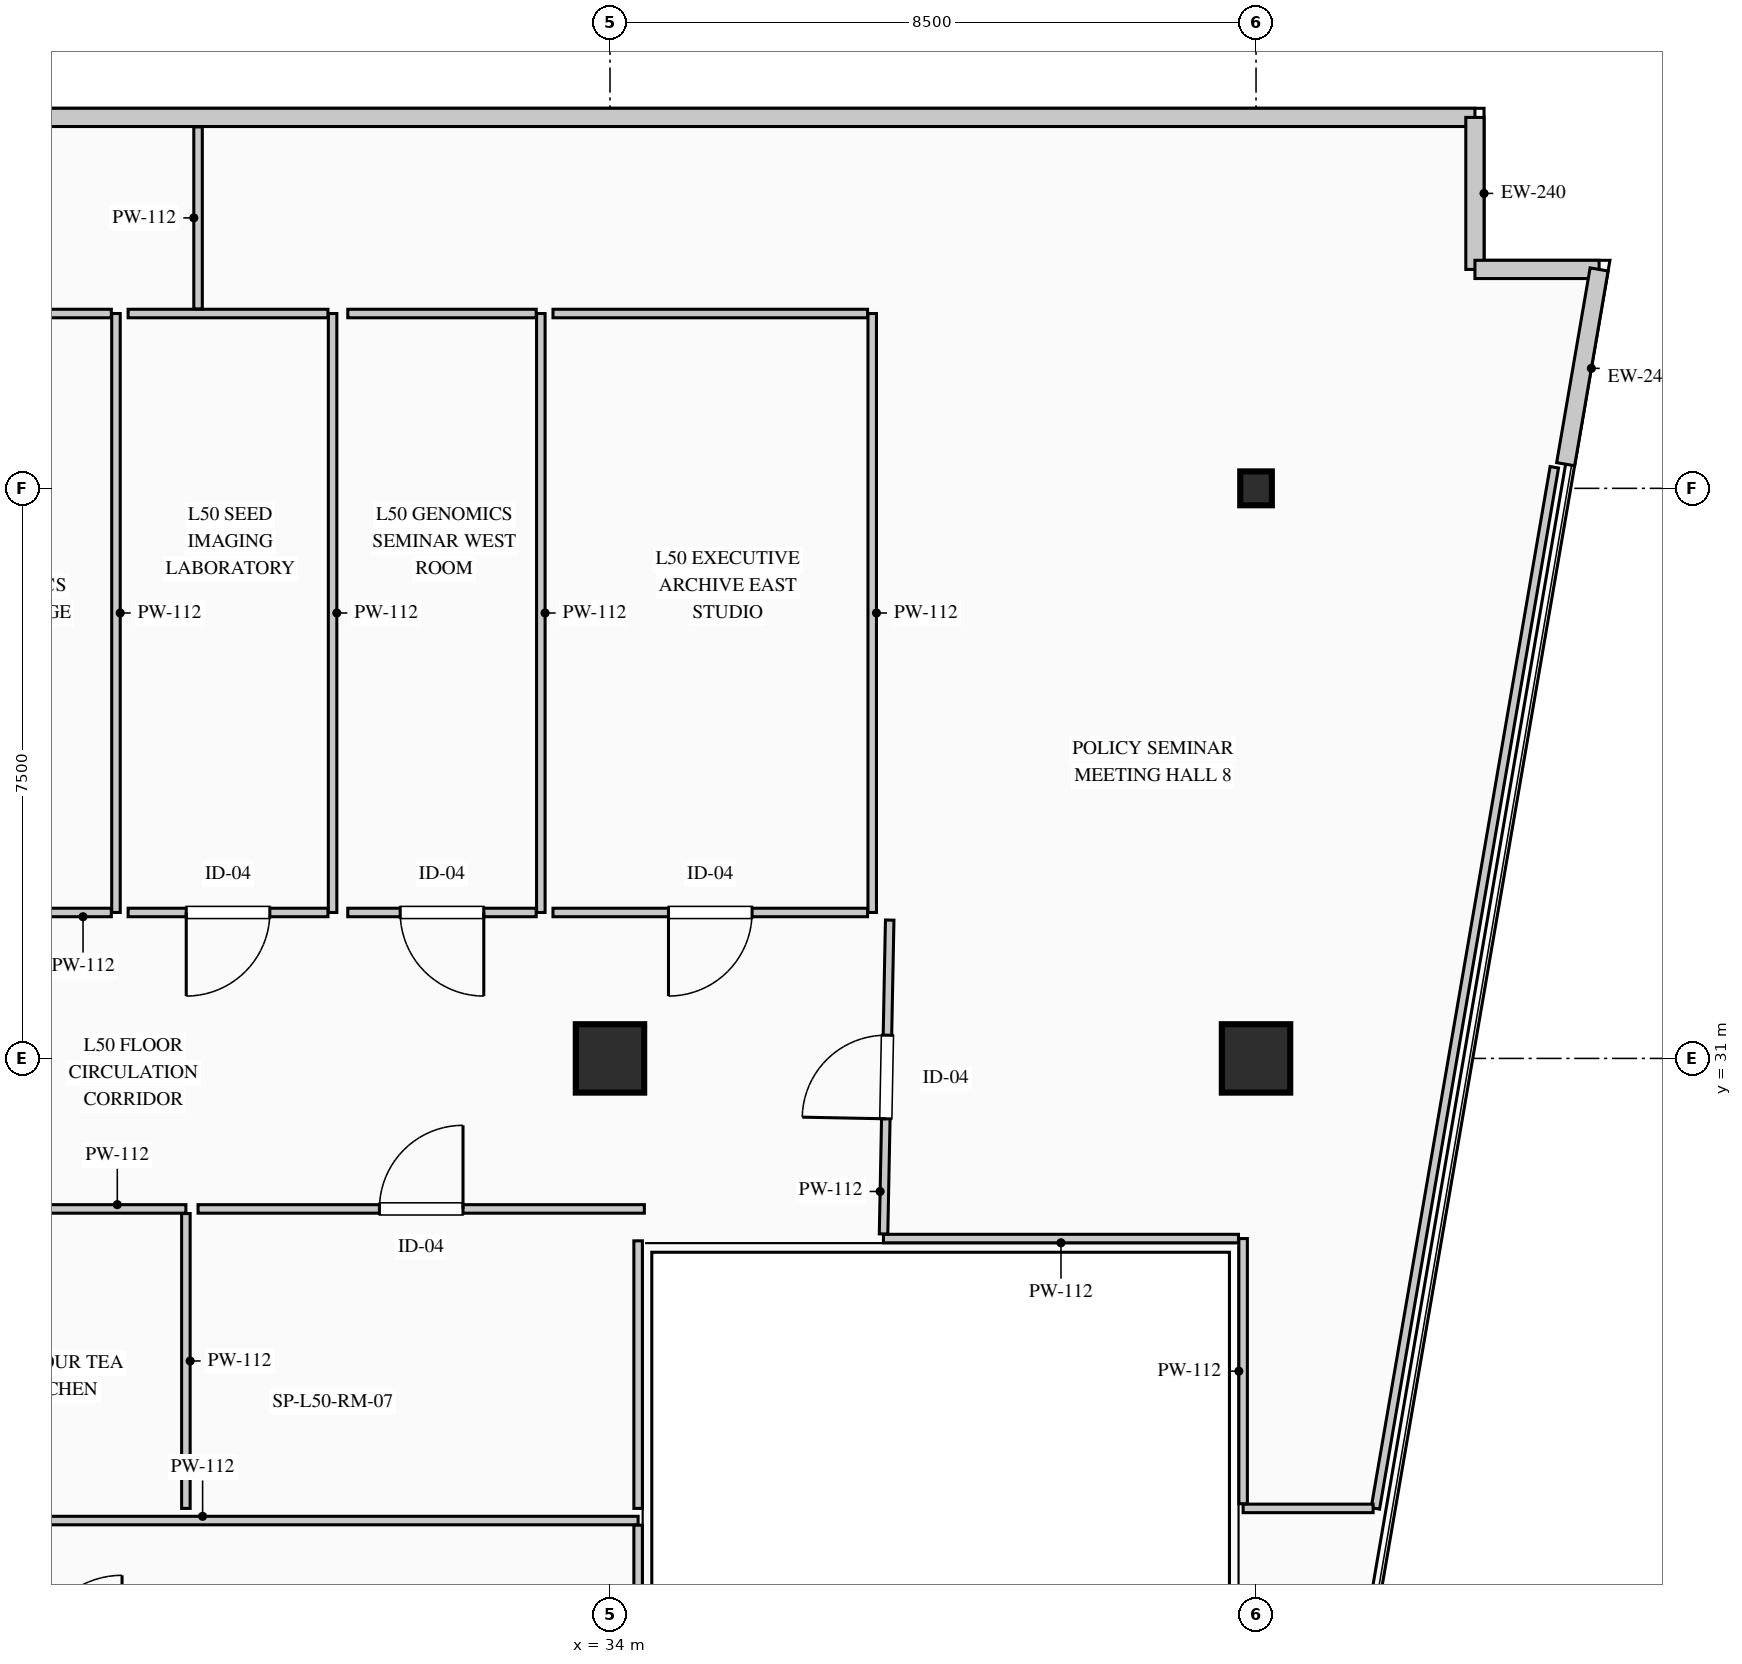
"""IFC4 building model, lengths in metres.
Left out: names, types, materials, properties, quantities, classifications, styles, units other than length and angle.
Written with IfcOpenShell. Run it as: python <this file> out.ifc"""

import sys

from ifc_helpers import new_model, si_unit, direction, frame, frame_2d, origin, origin_2d, place, context, subcontext, project, spatial, rectangle, i_section, extrude, element, fill, save


model = new_model("IFC4")
c1 = context("Model", 3, precision=1e-05, world=origin(), true_north=direction((0.0, 1.0)))
c2 = subcontext(c1, "Body", "Model", "MODEL_VIEW")
j1 = project(units=[si_unit("LENGTHUNIT", "METRE"), si_unit("PLANEANGLEUNIT", "RADIAN")], contexts=[c1])
p1 = place(None, origin())
s1 = spatial("IfcSite", under=j1, at=p1, CompositionType="ELEMENT")
p2 = place(p1, origin())
s2 = spatial("IfcBuilding", under=s1, at=p2, CompositionType="ELEMENT")
p3 = place(p2, frame((0.0, 0.0, 211.4)))
s3 = spatial("IfcBuildingStorey", under=s2, at=p3, CompositionType="ELEMENT", Elevation=211.4)
for number, where, z_axis, x_axis in (
    (1, (34.0, 31.0, 0.0), (0.0, 0.0, 1.0), (1.0, 0.0, 0.0)),
    (2, (42.5, 31.0, 0.0), (0.0, 0.0, 1.0), (1.0, 0.0, 0.0)),
):
    element("IfcColumn", number, at=place(p3, frame(where, z_axis=z_axis, x_axis=x_axis)), inside=s3, PredefinedType="COLUMN", context=c2, shape_type="SweptSolid", body=[
        extrude(rectangle(XDim=0.9, YDim=0.9, at=origin_2d()), origin(), (0.0, 0.0, 1.0), 3.95),
    ])
p4 = place(p3, frame((42.5, 38.5, 0.0), z_axis=(0.0, 0.0, 1.0), x_axis=(1.0, 0.0, 0.0)))
e3 = element("IfcColumn", 3, at=p4, inside=s3, PredefinedType="COLUMN", context=c2, shape_type="SweptSolid", body=[
    extrude(i_section(OverallWidth=0.416, OverallDepth=0.446, WebThickness=0.039, FlangeThickness=0.063, FilletRadius=0.015, at=origin_2d()), origin(), (0.0, 0.0, 1.0), 3.95),
])
p5 = place(p3, frame((4.62, 43.38, 0.0), z_axis=(0.0, 0.0, 1.0), x_axis=(1.0, 0.0, 0.0)))
e4 = element("IfcWall", 4, at=p5, inside=s3, PredefinedType="STANDARD", context=c2, shape_type="SweptSolid", body=[
    extrude(rectangle(XDim=40.76, YDim=0.24, at=frame_2d((20.38, 0.0))), origin(), (0.0, 0.0, 1.0), 3.7),
])
p6 = place(p5, frame((13.324, 0.0, 0.9)))
e5 = element("IfcOpeningElement", 5, at=p6, cuts=e4, PredefinedType="OPENING", context=c2, shape_type="SweptSolid", body=[
    extrude(rectangle(XDim=2.7, YDim=2.1, at=frame_2d((1.35, 1.05))), frame((0.0, 0.13, 0.0), z_axis=(0.0, -1.0, 0.0), x_axis=(1.0, 0.0, 0.0)), (0.0, 0.0, 1.0), 0.26),
])
p7 = place(p3, frame((45.38, 43.38, 0.0), z_axis=(0.0, 0.0, 1.0), x_axis=(0.0, -1.0, 0.0)))
e6 = element("IfcWall", 6, at=p7, inside=s3, PredefinedType="STANDARD", context=c2, shape_type="SweptSolid", body=[
    extrude(rectangle(XDim=2.0, YDim=0.24, at=frame_2d((1.0, 0.0))), origin(), (0.0, 0.0, 1.0), 3.7),
])
p8 = place(p3, frame((45.38, 41.38, 0.0), z_axis=(0.0, 0.0, 1.0), x_axis=(1.0, 0.0, 0.0)))
e7 = element("IfcWall", 7, at=p8, inside=s3, PredefinedType="STANDARD", context=c2, shape_type="SweptSolid", body=[
    extrude(rectangle(XDim=1.634, YDim=0.24, at=frame_2d((0.817, 0.0))), origin(), (0.0, 0.0, 1.0), 3.7),
])
p9 = place(p3, frame((47.014, 41.38, 0.0), z_axis=(0.0, 0.0, 1.0), x_axis=(-0.169406892601, -0.985546196147, 0.0)))
e8 = element("IfcWall", 8, at=p9, inside=s3, PredefinedType="STANDARD", context=c2, shape_type="SweptSolid", body=[
    extrude(rectangle(XDim=2.6, YDim=0.24, at=frame_2d((1.3, 0.0))), origin(), (0.0, 0.0, 1.0), 3.7),
])
p10 = place(p3, frame((27.5, 40.8, 0.0), z_axis=(0.0, 0.0, 1.0), x_axis=(0.0, -1.0, 0.0)))
e9 = element("IfcWall", 9, at=p10, inside=s3, PredefinedType="PARTITIONING", context=c2, shape_type="SweptSolid", body=[
    extrude(rectangle(XDim=7.88, YDim=0.112, at=frame_2d((3.94, 0.0))), origin(), (0.0, 0.0, 1.0), 3.7),
])
p11 = place(p3, frame((27.439, 32.92, 0.0), z_axis=(0.0, 0.0, 1.0), x_axis=(-1.0, 0.0, 0.0)))
e10 = element("IfcWall", 10, at=p11, inside=s3, PredefinedType="PARTITIONING", context=c2, shape_type="SweptSolid", body=[
    extrude(rectangle(XDim=3.389, YDim=0.112, at=frame_2d((1.694, 0.0))), origin(), (0.0, 0.0, 1.0), 3.7),
])
p12 = place(p11, frame((1.145, 0.0, 0.0)))
e11 = element("IfcOpeningElement", 11, at=p12, cuts=e10, PredefinedType="OPENING", context=c2, shape_type="SweptSolid", body=[
    extrude(rectangle(XDim=1.1, YDim=2.2, at=frame_2d((0.55, 1.1))), frame((0.0, 0.066, 0.0), z_axis=(0.0, -1.0, 0.0), x_axis=(1.0, 0.0, 0.0)), (0.0, 0.0, 1.0), 0.132),
])
p13 = place(p3, frame((24.111, 40.8, 0.0), z_axis=(0.0, 0.0, 1.0), x_axis=(1.0, 0.0, 0.0)))
e12 = element("IfcWall", 12, at=p13, inside=s3, PredefinedType="PARTITIONING", context=c2, shape_type="SweptSolid", body=[
    extrude(rectangle(XDim=3.328, YDim=0.112, at=frame_2d((1.664, 0.0))), origin(), (0.0, 0.0, 1.0), 3.7),
])
p14 = place(p3, frame((30.35, 40.8, 0.0), z_axis=(0.0, 0.0, 1.0), x_axis=(0.0, -1.0, 0.0)))
e13 = element("IfcWall", 13, at=p14, inside=s3, PredefinedType="PARTITIONING", context=c2, shape_type="SweptSolid", body=[
    extrude(rectangle(XDim=7.88, YDim=0.112, at=frame_2d((3.94, 0.0))), origin(), (0.0, 0.0, 1.0), 3.7),
])
p15 = place(p3, frame((30.289, 32.92, 0.0), z_axis=(0.0, 0.0, 1.0), x_axis=(-1.0, 0.0, 0.0)))
e14 = element("IfcWall", 14, at=p15, inside=s3, PredefinedType="PARTITIONING", context=c2, shape_type="SweptSolid", body=[
    extrude(rectangle(XDim=2.629, YDim=0.112, at=frame_2d((1.314, 0.0))), origin(), (0.0, 0.0, 1.0), 3.7),
])
p16 = place(p15, frame((0.764, 0.0, 0.0)))
e15 = element("IfcOpeningElement", 15, at=p16, cuts=e14, PredefinedType="OPENING", context=c2, shape_type="SweptSolid", body=[
    extrude(rectangle(XDim=1.1, YDim=2.2, at=frame_2d((0.55, 1.1))), frame((0.0, 0.066, 0.0), z_axis=(0.0, -1.0, 0.0), x_axis=(1.0, 0.0, 0.0)), (0.0, 0.0, 1.0), 0.132),
])
p17 = place(p3, frame((27.66, 40.8, 0.0), z_axis=(0.0, 0.0, 1.0), x_axis=(1.0, 0.0, 0.0)))
e16 = element("IfcWall", 16, at=p17, inside=s3, PredefinedType="PARTITIONING", context=c2, shape_type="SweptSolid", body=[
    extrude(rectangle(XDim=2.629, YDim=0.112, at=frame_2d((1.314, 0.0))), origin(), (0.0, 0.0, 1.0), 3.7),
])
p18 = place(p3, frame((33.09, 40.8, 0.0), z_axis=(0.0, 0.0, 1.0), x_axis=(0.0, -1.0, 0.0)))
e17 = element("IfcWall", 17, at=p18, inside=s3, PredefinedType="PARTITIONING", context=c2, shape_type="SweptSolid", body=[
    extrude(rectangle(XDim=7.88, YDim=0.112, at=frame_2d((3.94, 0.0))), origin(), (0.0, 0.0, 1.0), 3.7),
])
p19 = place(p3, frame((33.029, 32.92, 0.0), z_axis=(0.0, 0.0, 1.0), x_axis=(-1.0, 0.0, 0.0)))
e18 = element("IfcWall", 18, at=p19, inside=s3, PredefinedType="PARTITIONING", context=c2, shape_type="SweptSolid", body=[
    extrude(rectangle(XDim=2.479, YDim=0.112, at=frame_2d((1.24, 0.0))), origin(), (0.0, 0.0, 1.0), 3.7),
])
p20 = place(p19, frame((0.689, 0.0, 0.0)))
e19 = element("IfcOpeningElement", 19, at=p20, cuts=e18, PredefinedType="OPENING", context=c2, shape_type="SweptSolid", body=[
    extrude(rectangle(XDim=1.1, YDim=2.2, at=frame_2d((0.55, 1.1))), frame((0.0, 0.066, 0.0), z_axis=(0.0, -1.0, 0.0), x_axis=(1.0, 0.0, 0.0)), (0.0, 0.0, 1.0), 0.132),
])
p21 = place(p3, frame((30.55, 40.8, 0.0), z_axis=(0.0, 0.0, 1.0), x_axis=(1.0, 0.0, 0.0)))
e20 = element("IfcWall", 20, at=p21, inside=s3, PredefinedType="PARTITIONING", context=c2, shape_type="SweptSolid", body=[
    extrude(rectangle(XDim=2.479, YDim=0.112, at=frame_2d((1.24, 0.0))), origin(), (0.0, 0.0, 1.0), 3.7),
])
p22 = place(p3, frame((37.45, 40.8, 0.0), z_axis=(0.0, 0.0, 1.0), x_axis=(0.0, -1.0, 0.0)))
e21 = element("IfcWall", 21, at=p22, inside=s3, PredefinedType="PARTITIONING", context=c2, shape_type="SweptSolid", body=[
    extrude(rectangle(XDim=7.88, YDim=0.112, at=frame_2d((3.94, 0.0))), origin(), (0.0, 0.0, 1.0), 3.7),
])
p23 = place(p3, frame((37.389, 32.92, 0.0), z_axis=(0.0, 0.0, 1.0), x_axis=(-1.0, 0.0, 0.0)))
e22 = element("IfcWall", 22, at=p23, inside=s3, PredefinedType="PARTITIONING", context=c2, shape_type="SweptSolid", body=[
    extrude(rectangle(XDim=4.139, YDim=0.112, at=frame_2d((2.069, 0.0))), origin(), (0.0, 0.0, 1.0), 3.7),
])
p24 = place(p23, frame((1.52, 0.0, 0.0)))
e23 = element("IfcOpeningElement", 23, at=p24, cuts=e22, PredefinedType="OPENING", context=c2, shape_type="SweptSolid", body=[
    extrude(rectangle(XDim=1.1, YDim=2.2, at=frame_2d((0.55, 1.1))), frame((0.0, 0.066, 0.0), z_axis=(0.0, -1.0, 0.0), x_axis=(1.0, 0.0, 0.0)), (0.0, 0.0, 1.0), 0.132),
])
p25 = place(p3, frame((33.25, 40.8, 0.0), z_axis=(0.0, 0.0, 1.0), x_axis=(1.0, 0.0, 0.0)))
e24 = element("IfcWall", 24, at=p25, inside=s3, PredefinedType="PARTITIONING", context=c2, shape_type="SweptSolid", body=[
    extrude(rectangle(XDim=4.139, YDim=0.112, at=frame_2d((2.069, 0.0))), origin(), (0.0, 0.0, 1.0), 3.7),
])
p26 = place(p3, frame((22.91, 24.92, 0.0), z_axis=(0.0, 0.0, 1.0), x_axis=(1.0, 0.0, 0.0)))
e25 = element("IfcWall", 25, at=p26, inside=s3, PredefinedType="PARTITIONING", context=c2, shape_type="SweptSolid", body=[
    extrude(rectangle(XDim=11.46, YDim=0.112, at=frame_2d((5.73, 0.0))), origin(), (0.0, 0.0, 1.0), 3.325),
])
p27 = place(p3, frame((34.37, 24.859, 0.0), z_axis=(0.0, 0.0, 1.0), x_axis=(0.0, -1.0, 0.0)))
e26 = element("IfcWall", 26, at=p27, inside=s3, PredefinedType="PARTITIONING", context=c2, shape_type="SweptSolid", body=[
    extrude(rectangle(XDim=5.239, YDim=0.112, at=frame_2d((2.619, 0.0))), origin(), (0.0, 0.0, 1.0), 3.7),
])
p28 = place(p3, frame((22.91, 29.02, 0.0), z_axis=(0.0, 0.0, 1.0), x_axis=(1.0, 0.0, 0.0)))
e27 = element("IfcWall", 27, at=p28, inside=s3, PredefinedType="PARTITIONING", context=c2, shape_type="SweptSolid", body=[
    extrude(rectangle(XDim=5.51, YDim=0.112, at=frame_2d((2.755, 0.0))), origin(), (0.0, 0.0, 1.0), 3.485),
])
p29 = place(p28, frame((2.205, 0.0, 0.0)))
e28 = element("IfcOpeningElement", 28, at=p29, cuts=e27, PredefinedType="OPENING", context=c2, shape_type="SweptSolid", body=[
    extrude(rectangle(XDim=1.1, YDim=2.2, at=frame_2d((0.55, 1.1))), frame((0.0, 0.066, 0.0), z_axis=(0.0, -1.0, 0.0), x_axis=(1.0, 0.0, 0.0)), (0.0, 0.0, 1.0), 0.132),
])
p30 = place(p3, frame((28.42, 28.959, 0.0), z_axis=(0.0, 0.0, 1.0), x_axis=(0.0, -1.0, 0.0)))
e29 = element("IfcWall", 29, at=p30, inside=s3, PredefinedType="PARTITIONING", context=c2, shape_type="SweptSolid", body=[
    extrude(rectangle(XDim=3.879, YDim=0.112, at=frame_2d((1.939, 0.0))), origin(), (0.0, 0.0, 1.0), 3.7),
])
p31 = place(p3, frame((34.37, 28.6, 0.0), z_axis=(0.0, 0.0, 1.0), x_axis=(0.0, -1.0, 0.0)))
e30 = element("IfcWall", 30, at=p31, inside=s3, PredefinedType="PARTITIONING", context=c2, shape_type="SweptSolid", body=[
    extrude(rectangle(XDim=3.52, YDim=0.112, at=frame_2d((1.76, 0.0))), origin(), (0.0, 0.0, 1.0), 3.7),
])
p32 = place(p3, frame((28.58, 29.02, 0.0), z_axis=(0.0, 0.0, 1.0), x_axis=(1.0, 0.0, 0.0)))
e31 = element("IfcWall", 31, at=p32, inside=s3, PredefinedType="PARTITIONING", context=c2, shape_type="SweptSolid", body=[
    extrude(rectangle(XDim=5.872, YDim=0.112, at=frame_2d((2.936, 0.0))), origin(), (0.0, 0.0, 1.0), 3.485),
])
p33 = place(p32, frame((2.386, 0.0, 0.0)))
e32 = element("IfcOpeningElement", 32, at=p33, cuts=e31, PredefinedType="OPENING", context=c2, shape_type="SweptSolid", body=[
    extrude(rectangle(XDim=1.1, YDim=2.2, at=frame_2d((0.55, 1.1))), frame((0.0, 0.066, 0.0), z_axis=(0.0, -1.0, 0.0), x_axis=(1.0, 0.0, 0.0)), (0.0, 0.0, 1.0), 0.132),
])
p34 = place(p3, frame((46.425, 38.777, 0.0), z_axis=(0.0, 0.0, 1.0), x_axis=(-0.169413343695, -0.985545087238, 0.0)))
e33 = element("IfcWall", 33, at=p34, inside=s3, PredefinedType="PARTITIONING", context=c2, shape_type="SweptSolid", body=[
    extrude(rectangle(XDim=13.898, YDim=0.112, at=frame_2d((6.949, 0.0))), origin(), (0.0, 0.0, 1.0), 3.7),
])
p35 = place(p3, frame((44.041, 25.08, 0.0), z_axis=(0.0, 0.0, 1.0), x_axis=(-1.0, 0.0, 0.0)))
e34 = element("IfcWall", 34, at=p35, inside=s3, PredefinedType="PARTITIONING", context=c2, shape_type="SweptSolid", body=[
    extrude(rectangle(XDim=1.71, YDim=0.112, at=frame_2d((0.855, 0.0))), origin(), (0.0, 0.0, 1.0), 3.7),
])
p36 = place(p3, frame((42.33, 25.141, 0.0), z_axis=(0.0, 0.0, 1.0), x_axis=(0.0, 1.0, 0.0)))
e35 = element("IfcWall", 35, at=p36, inside=s3, PredefinedType="PARTITIONING", context=c2, shape_type="SweptSolid", body=[
    extrude(rectangle(XDim=3.489, YDim=0.112, at=frame_2d((1.744, 0.0))), origin(), (0.0, 0.0, 1.0), 3.7),
])
p37 = place(p3, frame((42.269, 28.63, 0.0), z_axis=(0.0, 0.0, 1.0), x_axis=(-1.0, 0.0, 0.0)))
e36 = element("IfcWall", 36, at=p37, inside=s3, PredefinedType="PARTITIONING", context=c2, shape_type="SweptSolid", body=[
    extrude(rectangle(XDim=4.671, YDim=0.112, at=frame_2d((2.335, 0.0))), origin(), (0.0, 0.0, 1.0), 3.7),
])
p38 = place(p3, frame((37.599, 28.691, 0.0), z_axis=(0.0, 0.0, 1.0), x_axis=(0.019566997539, 0.999808547977, 0.0)))
e37 = element("IfcWall", 37, at=p38, inside=s3, PredefinedType="PARTITIONING", context=c2, shape_type="SweptSolid", body=[
    extrude(rectangle(XDim=4.13, YDim=0.112, at=frame_2d((2.065, 0.0))), origin(), (0.0, 0.0, 1.0), 3.7),
])
p39 = place(p38, frame((1.515, 0.0, 0.0)))
e38 = element("IfcOpeningElement", 38, at=p39, cuts=e37, PredefinedType="OPENING", context=c2, shape_type="SweptSolid", body=[
    extrude(rectangle(XDim=1.1, YDim=2.2, at=frame_2d((0.55, 1.1))), frame((0.0, 0.066, 0.0), z_axis=(0.0, -1.0, 0.0), x_axis=(1.0, 0.0, 0.0)), (0.0, 0.0, 1.0), 0.132),
])
p40 = place(p3, frame((28.58, 40.861, 0.0), z_axis=(0.0, 0.0, 1.0), x_axis=(0.0, 1.0, 0.0)))
e39 = element("IfcWall", 39, at=p40, inside=s3, PredefinedType="PARTITIONING", context=c2, shape_type="SweptSolid", body=[
    extrude(rectangle(XDim=2.394, YDim=0.112, at=frame_2d((1.197, 0.0))), origin(), (0.0, 0.0, 1.0), 3.7),
])
p41 = place(p16, origin())
e40 = element("IfcDoor", 40, at=p41, inside=s3, OperationType="SINGLE_SWING_RIGHT", PredefinedType="DOOR", context=c2, shape_type="SweptSolid", body=[
    extrude(rectangle(XDim=1.1, YDim=2.2, at=frame_2d((0.55, 1.1))), frame((0.0, 0.025, 0.0), z_axis=(0.0, -1.0, 0.0), x_axis=(1.0, 0.0, 0.0)), (0.0, 0.0, 1.0), 0.05),
])
fill(e15, e40)
p42 = place(p20, origin())
e41 = element("IfcDoor", 41, at=p42, inside=s3, OperationType="SINGLE_SWING_LEFT", PredefinedType="DOOR", context=c2, shape_type="SweptSolid", body=[
    extrude(rectangle(XDim=1.1, YDim=2.2, at=frame_2d((0.55, 1.1))), frame((0.0, 0.025, 0.0), z_axis=(0.0, -1.0, 0.0), x_axis=(1.0, 0.0, 0.0)), (0.0, 0.0, 1.0), 0.05),
])
fill(e19, e41)
p43 = place(p24, origin())
e42 = element("IfcDoor", 42, at=p43, inside=s3, OperationType="SINGLE_SWING_RIGHT", PredefinedType="DOOR", context=c2, shape_type="SweptSolid", body=[
    extrude(rectangle(XDim=1.1, YDim=2.2, at=frame_2d((0.55, 1.1))), frame((0.0, 0.025, 0.0), z_axis=(0.0, -1.0, 0.0), x_axis=(1.0, 0.0, 0.0)), (0.0, 0.0, 1.0), 0.05),
])
fill(e23, e42)
p44 = place(p33, origin())
e43 = element("IfcDoor", 43, at=p44, inside=s3, OperationType="SINGLE_SWING_RIGHT", PredefinedType="DOOR", context=c2, shape_type="SweptSolid", body=[
    extrude(rectangle(XDim=1.1, YDim=2.2, at=frame_2d((0.55, 1.1))), frame((0.0, 0.025, 0.0), z_axis=(0.0, -1.0, 0.0), x_axis=(1.0, 0.0, 0.0)), (0.0, 0.0, 1.0), 0.05),
])
fill(e32, e43)
p45 = place(p39, origin())
e44 = element("IfcDoor", 44, at=p45, inside=s3, OperationType="SINGLE_SWING_LEFT", PredefinedType="DOOR", context=c2, shape_type="SweptSolid", body=[
    extrude(rectangle(XDim=1.1, YDim=2.2, at=frame_2d((0.55, 1.1))), frame((0.0, 0.025, 0.0), z_axis=(0.0, -1.0, 0.0), x_axis=(1.0, 0.0, 0.0)), (0.0, 0.0, 1.0), 0.05),
])
fill(e38, e44)
save(model, sys.argv[1])
